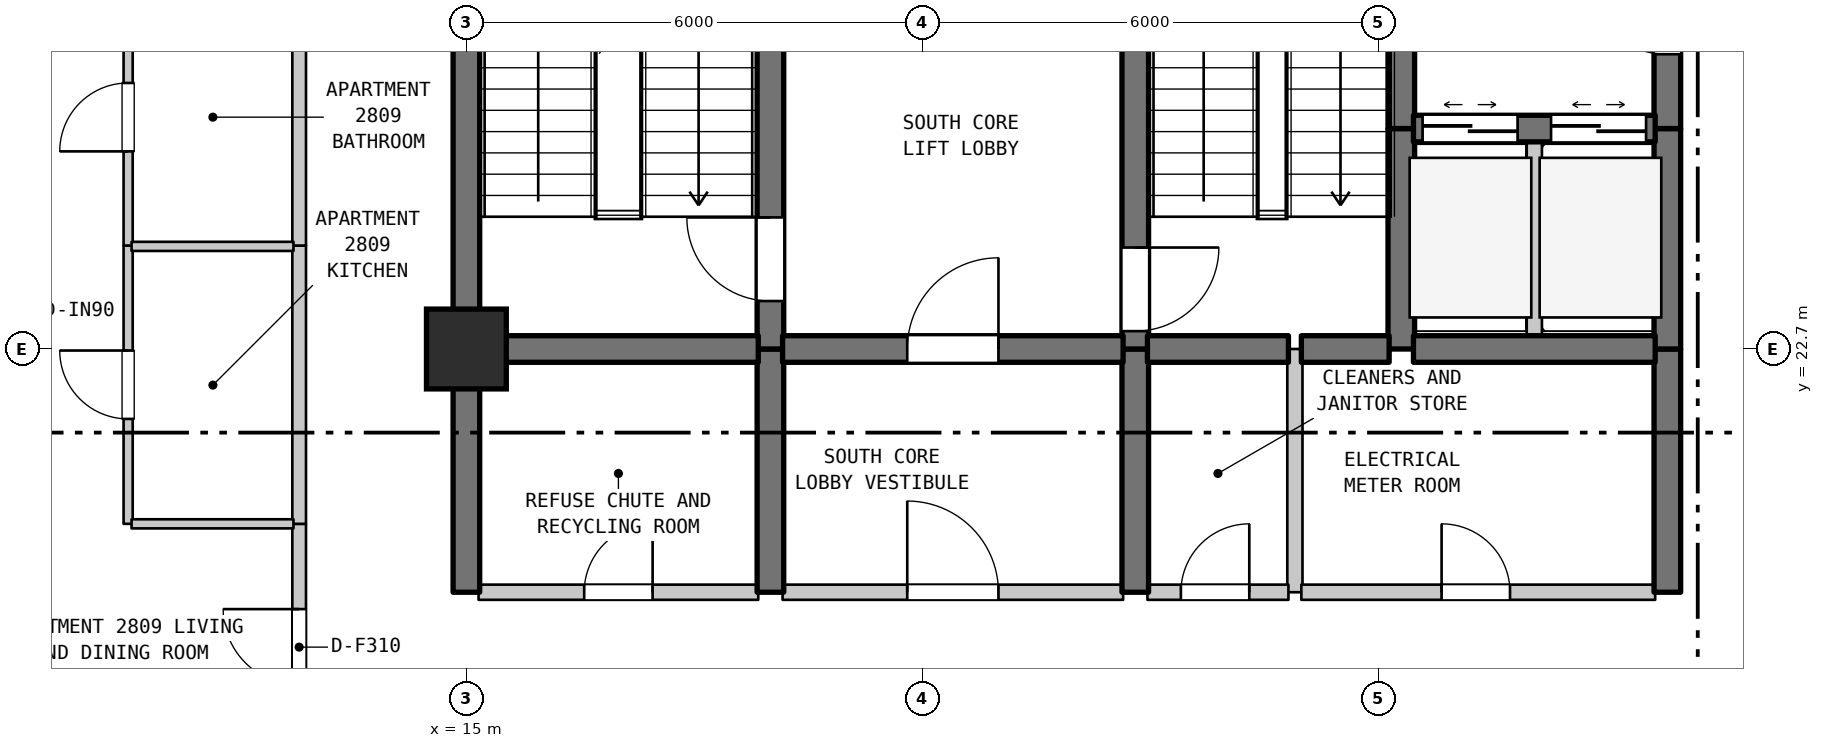
"""IFC4 building model, lengths in metres.
Left out: names, types, materials, properties, quantities, classifications, styles, units other than length and angle.
Written with IfcOpenShell. Run it as: python <this file> out.ifc"""

import sys

from ifc_helpers import new_model, si_unit, direction, frame, frame_2d, origin, origin_2d, place, context, subcontext, project, spatial, rectangle, extrude, element, fill, save


model = new_model("IFC4")
c1 = context("Model", 3, precision=1e-05, world=origin(), true_north=direction((0.0, 1.0)))
c2 = subcontext(c1, "Body", "Model", "MODEL_VIEW")
j1 = project(units=[si_unit("LENGTHUNIT", "METRE"), si_unit("PLANEANGLEUNIT", "RADIAN")], contexts=[c1])
p1 = place(None, origin())
s1 = spatial("IfcSite", under=j1, at=p1, CompositionType="ELEMENT")
p2 = place(p1, origin())
s2 = spatial("IfcBuilding", under=s1, at=p2, CompositionType="ELEMENT")
p3 = place(p2, frame((0.0, 0.0, 116.8)))
s3 = spatial("IfcBuildingStorey", under=s2, at=p3, CompositionType="ELEMENT", Elevation=116.8)
p4 = place(p3, frame((15.0, 22.7, 0.0), z_axis=(0.0, 0.0, 1.0), x_axis=(1.0, 0.0, 0.0)))
e1 = element("IfcColumn", 1, at=p4, inside=s3, PredefinedType="COLUMN", context=c2, shape_type="SweptSolid", body=[
    extrude(rectangle(XDim=1.05, YDim=1.05, at=origin_2d()), origin(), (0.0, 0.0, 1.0), 3.7),
])
p5 = place(p3, frame((10.55, 20.4, 0.0), z_axis=(0.0, 0.0, 1.0), x_axis=(0.0, 1.0, 0.0)))
e2 = element("IfcWall", 2, at=p5, inside=s3, PredefinedType="PARTITIONING", context=c2, shape_type="SweptSolid", body=[
    extrude(rectangle(XDim=3.661, YDim=0.12, at=frame_2d((1.831, 0.0))), origin(), (0.0, 0.0, 1.0), 3.38),
])
p6 = place(p5, frame((1.38, 0.0, 0.0)))
e3 = element("IfcOpeningElement", 3, at=p6, cuts=e2, PredefinedType="OPENING", context=c2, shape_type="SweptSolid", body=[
    extrude(rectangle(XDim=0.9, YDim=2.15, at=frame_2d((0.45, 1.075))), frame((0.0, 0.07, 0.0), z_axis=(0.0, -1.0, 0.0), x_axis=(1.0, 0.0, 0.0)), (0.0, 0.0, 1.0), 0.14),
])
p7 = place(p3, frame((10.55, 24.061, 0.0), z_axis=(0.0, 0.0, 1.0), x_axis=(0.0, 1.0, 0.0)))
e4 = element("IfcWall", 4, at=p7, inside=s3, PredefinedType="PARTITIONING", context=c2, shape_type="SweptSolid", body=[
    extrude(rectangle(XDim=3.379, YDim=0.12, at=frame_2d((1.689, 0.0))), origin(), (0.0, 0.0, 1.0), 3.38),
])
p8 = place(p7, frame((1.239, 0.0, 0.0)))
e5 = element("IfcOpeningElement", 5, at=p8, cuts=e4, PredefinedType="OPENING", context=c2, shape_type="SweptSolid", body=[
    extrude(rectangle(XDim=0.9, YDim=2.1, at=frame_2d((0.45, 1.05))), frame((0.0, 0.07, 0.0), z_axis=(0.0, -1.0, 0.0), x_axis=(1.0, 0.0, 0.0)), (0.0, 0.0, 1.0), 0.14),
])
p9 = place(p3, frame((12.8, 17.3, 0.0), z_axis=(0.0, 0.0, 1.0), x_axis=(0.0, 1.0, 0.0)))
e6 = element("IfcWall", 6, at=p9, inside=s3, PredefinedType="STANDARD", context=c2, shape_type="SweptSolid", body=[
    extrude(rectangle(XDim=3.1, YDim=0.18, at=frame_2d((1.55, 0.0))), origin(), (0.0, 0.0, 1.0), 3.38),
])
p10 = place(p9, frame((0.978, 0.0, 0.0)))
e7 = element("IfcOpeningElement", 7, at=p10, cuts=e6, PredefinedType="OPENING", context=c2, shape_type="SweptSolid", body=[
    extrude(rectangle(XDim=1.0, YDim=2.15, at=frame_2d((0.5, 1.075))), frame((0.0, 0.1, 0.0), z_axis=(0.0, -1.0, 0.0), x_axis=(1.0, 0.0, 0.0)), (0.0, 0.0, 1.0), 0.2),
])
p11 = place(p3, frame((12.8, 20.4, 0.0), z_axis=(0.0, 0.0, 1.0), x_axis=(0.0, 1.0, 0.0)))
e8 = element("IfcWall", 8, at=p11, inside=s3, PredefinedType="STANDARD", context=c2, shape_type="SweptSolid", body=[
    extrude(rectangle(XDim=3.661, YDim=0.18, at=frame_2d((1.831, 0.0))), origin(), (0.0, 0.0, 1.0), 3.38),
])
p12 = place(p3, frame((12.8, 24.061, 0.0), z_axis=(0.0, 0.0, 1.0), x_axis=(0.0, 1.0, 0.0)))
e9 = element("IfcWall", 9, at=p12, inside=s3, PredefinedType="STANDARD", context=c2, shape_type="SweptSolid", body=[
    extrude(rectangle(XDim=3.379, YDim=0.18, at=frame_2d((1.689, 0.0))), origin(), (0.0, 0.0, 1.0), 3.38),
])
p13 = place(p3, frame((15.0, 19.5, 0.0), z_axis=(0.0, 0.0, 1.0), x_axis=(0.0, 1.0, 0.0)))
e10 = element("IfcWall", 10, at=p13, inside=s3, PredefinedType="SHEAR", context=c2, shape_type="SweptSolid", body=[
    extrude(rectangle(XDim=3.2, YDim=0.35, at=frame_2d((1.6, 0.0))), origin(), (0.0, 0.0, 1.0), 3.38),
])
p14 = place(p3, frame((15.0, 22.7, 0.0), z_axis=(0.0, 0.0, 1.0), x_axis=(0.0, 1.0, 0.0)))
e11 = element("IfcWall", 11, at=p14, inside=s3, PredefinedType="SHEAR", context=c2, shape_type="SweptSolid", body=[
    extrude(rectangle(XDim=6.8, YDim=0.35, at=frame_2d((3.4, 0.0))), origin(), (0.0, 0.0, 1.0), 3.38),
])
p15 = place(p3, frame((19.0, 19.5, 0.0), z_axis=(0.0, 0.0, 1.0), x_axis=(0.0, 1.0, 0.0)))
e12 = element("IfcWall", 12, at=p15, inside=s3, PredefinedType="SHEAR", context=c2, shape_type="SweptSolid", body=[
    extrude(rectangle(XDim=3.2, YDim=0.35, at=frame_2d((1.6, 0.0))), origin(), (0.0, 0.0, 1.0), 3.38),
])
p16 = place(p3, frame((19.0, 22.7, 0.0), z_axis=(0.0, 0.0, 1.0), x_axis=(0.0, 1.0, 0.0)))
e13 = element("IfcWall", 13, at=p16, inside=s3, PredefinedType="SHEAR", context=c2, shape_type="SweptSolid", body=[
    extrude(rectangle(XDim=5.5, YDim=0.35, at=frame_2d((2.75, 0.0))), origin(), (0.0, 0.0, 1.0), 3.38),
])
p17 = place(p16, frame((0.631, 0.0, 0.0)))
e14 = element("IfcOpeningElement", 14, at=p17, cuts=e13, PredefinedType="OPENING", context=c2, shape_type="SweptSolid", body=[
    extrude(rectangle(XDim=1.1, YDim=2.15, at=frame_2d((0.55, 1.075))), frame((0.0, 0.185, 0.0), z_axis=(0.0, -1.0, 0.0), x_axis=(1.0, 0.0, 0.0)), (0.0, 0.0, 1.0), 0.37),
])
p18 = place(p3, frame((23.8, 19.5, 0.0), z_axis=(0.0, 0.0, 1.0), x_axis=(0.0, 1.0, 0.0)))
e15 = element("IfcWall", 15, at=p18, inside=s3, PredefinedType="SHEAR", context=c2, shape_type="SweptSolid", body=[
    extrude(rectangle(XDim=3.2, YDim=0.35, at=frame_2d((1.6, 0.0))), origin(), (0.0, 0.0, 1.0), 3.38),
])
p19 = place(p3, frame((23.8, 22.7, 0.0), z_axis=(0.0, 0.0, 1.0), x_axis=(0.0, 1.0, 0.0)))
e16 = element("IfcWall", 16, at=p19, inside=s3, PredefinedType="SHEAR", context=c2, shape_type="SweptSolid", body=[
    extrude(rectangle(XDim=5.5, YDim=0.35, at=frame_2d((2.75, 0.0))), origin(), (0.0, 0.0, 1.0), 3.38),
])
p20 = place(p19, frame((0.235, 0.0, 0.0)))
e17 = element("IfcOpeningElement", 17, at=p20, cuts=e16, PredefinedType="OPENING", context=c2, shape_type="SweptSolid", body=[
    extrude(rectangle(XDim=1.1, YDim=2.15, at=frame_2d((0.55, 1.075))), frame((0.0, 0.185, 0.0), z_axis=(0.0, -1.0, 0.0), x_axis=(1.0, 0.0, 0.0)), (0.0, 0.0, 1.0), 0.37),
])
p21 = place(p3, frame((25.9, 19.5, 0.0), z_axis=(0.0, 0.0, 1.0), x_axis=(0.0, 1.0, 0.0)))
e18 = element("IfcWall", 18, at=p21, inside=s3, PredefinedType="STANDARD", context=c2, shape_type="SweptSolid", body=[
    extrude(rectangle(XDim=3.2, YDim=0.2, at=frame_2d((1.6, 0.0))), origin(), (0.0, 0.0, 1.0), 3.38),
])
p22 = place(p3, frame((27.3, 22.7, 0.0), z_axis=(0.0, 0.0, 1.0), x_axis=(0.0, 1.0, 0.0)))
e19 = element("IfcWall", 19, at=p22, inside=s3, PredefinedType="SHEAR", context=c2, shape_type="SweptSolid", body=[
    extrude(rectangle(XDim=2.9, YDim=0.35, at=frame_2d((1.45, 0.0))), origin(), (0.0, 0.0, 1.0), 3.38),
])
p23 = place(p3, frame((27.3, 25.6, 0.0), z_axis=(0.0, 0.0, 1.0), x_axis=(0.0, 1.0, 0.0)))
e20 = element("IfcWall", 20, at=p23, inside=s3, PredefinedType="SHEAR", context=c2, shape_type="SweptSolid", body=[
    extrude(rectangle(XDim=3.3, YDim=0.35, at=frame_2d((1.65, 0.0))), origin(), (0.0, 0.0, 1.0), 3.38),
])
p24 = place(p3, frame((29.05, 22.7, 0.0), z_axis=(0.0, 0.0, 1.0), x_axis=(0.0, 1.0, 0.0)))
e21 = element("IfcWall", 21, at=p24, inside=s3, PredefinedType="STANDARD", context=c2, shape_type="SweptSolid", body=[
    extrude(rectangle(XDim=2.9, YDim=0.2, at=frame_2d((1.45, 0.0))), origin(), (0.0, 0.0, 1.0), 3.38),
])
p25 = place(p3, frame((30.8, 19.5, 0.0), z_axis=(0.0, 0.0, 1.0), x_axis=(0.0, 1.0, 0.0)))
e22 = element("IfcWall", 22, at=p25, inside=s3, PredefinedType="SHEAR", context=c2, shape_type="SweptSolid", body=[
    extrude(rectangle(XDim=3.2, YDim=0.35, at=frame_2d((1.6, 0.0))), origin(), (0.0, 0.0, 1.0), 3.38),
])
p26 = place(p3, frame((30.8, 22.7, 0.0), z_axis=(0.0, 0.0, 1.0), x_axis=(0.0, 1.0, 0.0)))
e23 = element("IfcWall", 23, at=p26, inside=s3, PredefinedType="SHEAR", context=c2, shape_type="SweptSolid", body=[
    extrude(rectangle(XDim=2.9, YDim=0.35, at=frame_2d((1.45, 0.0))), origin(), (0.0, 0.0, 1.0), 3.38),
])
p27 = place(p3, frame((30.8, 25.6, 0.0), z_axis=(0.0, 0.0, 1.0), x_axis=(0.0, 1.0, 0.0)))
e24 = element("IfcWall", 24, at=p27, inside=s3, PredefinedType="SHEAR", context=c2, shape_type="SweptSolid", body=[
    extrude(rectangle(XDim=3.3, YDim=0.35, at=frame_2d((1.65, 0.0))), origin(), (0.0, 0.0, 1.0), 3.38),
])
p28 = place(p27, frame((0.978, 0.0, 0.0)))
e25 = element("IfcOpeningElement", 25, at=p28, cuts=e24, PredefinedType="OPENING", context=c2, shape_type="SweptSolid", body=[
    extrude(rectangle(XDim=1.2, YDim=2.2, at=frame_2d((0.6, 1.1))), frame((0.0, 0.185, 0.0), z_axis=(0.0, -1.0, 0.0), x_axis=(1.0, 0.0, 0.0)), (0.0, 0.0, 1.0), 0.37),
])
p29 = place(p3, frame((15.16, 19.5, 0.0), z_axis=(0.0, 0.0, 1.0), x_axis=(1.0, 0.0, 0.0)))
e26 = element("IfcWall", 26, at=p29, inside=s3, PredefinedType="STANDARD", context=c2, shape_type="SweptSolid", body=[
    extrude(rectangle(XDim=3.68, YDim=0.2, at=frame_2d((1.84, 0.0))), origin(), (0.0, 0.0, 1.0), 3.38),
])
p30 = place(p29, frame((1.39, 0.0, 0.0)))
e27 = element("IfcOpeningElement", 27, at=p30, cuts=e26, PredefinedType="OPENING", context=c2, shape_type="SweptSolid", body=[
    extrude(rectangle(XDim=0.9, YDim=2.15, at=frame_2d((0.45, 1.075))), frame((0.0, 0.11, 0.0), z_axis=(0.0, -1.0, 0.0), x_axis=(1.0, 0.0, 0.0)), (0.0, 0.0, 1.0), 0.22),
])
p31 = place(p3, frame((19.16, 19.5, 0.0), z_axis=(0.0, 0.0, 1.0), x_axis=(1.0, 0.0, 0.0)))
e28 = element("IfcWall", 28, at=p31, inside=s3, PredefinedType="STANDARD", context=c2, shape_type="SweptSolid", body=[
    extrude(rectangle(XDim=4.48, YDim=0.2, at=frame_2d((2.24, 0.0))), origin(), (0.0, 0.0, 1.0), 3.38),
])
p32 = place(p31, frame((1.64, 0.0, 0.0)))
e29 = element("IfcOpeningElement", 29, at=p32, cuts=e28, PredefinedType="OPENING", context=c2, shape_type="SweptSolid", body=[
    extrude(rectangle(XDim=1.2, YDim=2.2, at=frame_2d((0.6, 1.1))), frame((0.0, 0.11, 0.0), z_axis=(0.0, -1.0, 0.0), x_axis=(1.0, 0.0, 0.0)), (0.0, 0.0, 1.0), 0.22),
])
p33 = place(p3, frame((23.96, 19.5, 0.0), z_axis=(0.0, 0.0, 1.0), x_axis=(1.0, 0.0, 0.0)))
e30 = element("IfcWall", 30, at=p33, inside=s3, PredefinedType="STANDARD", context=c2, shape_type="SweptSolid", body=[
    extrude(rectangle(XDim=1.855, YDim=0.2, at=frame_2d((0.927, 0.0))), origin(), (0.0, 0.0, 1.0), 3.38),
])
p34 = place(p33, frame((0.44, 0.0, 0.0)))
e31 = element("IfcOpeningElement", 31, at=p34, cuts=e30, PredefinedType="OPENING", context=c2, shape_type="SweptSolid", body=[
    extrude(rectangle(XDim=0.9, YDim=2.15, at=frame_2d((0.45, 1.075))), frame((0.0, 0.11, 0.0), z_axis=(0.0, -1.0, 0.0), x_axis=(1.0, 0.0, 0.0)), (0.0, 0.0, 1.0), 0.22),
])
p35 = place(p3, frame((25.985, 19.5, 0.0), z_axis=(0.0, 0.0, 1.0), x_axis=(1.0, 0.0, 0.0)))
e32 = element("IfcWall", 32, at=p35, inside=s3, PredefinedType="STANDARD", context=c2, shape_type="SweptSolid", body=[
    extrude(rectangle(XDim=4.655, YDim=0.2, at=frame_2d((2.327, 0.0))), origin(), (0.0, 0.0, 1.0), 3.38),
])
p36 = place(p35, frame((1.845, 0.0, 0.0)))
e33 = element("IfcOpeningElement", 33, at=p36, cuts=e32, PredefinedType="OPENING", context=c2, shape_type="SweptSolid", body=[
    extrude(rectangle(XDim=0.9, YDim=2.15, at=frame_2d((0.45, 1.075))), frame((0.0, 0.11, 0.0), z_axis=(0.0, -1.0, 0.0), x_axis=(1.0, 0.0, 0.0)), (0.0, 0.0, 1.0), 0.22),
])
p37 = place(p3, frame((10.595, 20.4, 0.0), z_axis=(0.0, 0.0, 1.0), x_axis=(1.0, 0.0, 0.0)))
e34 = element("IfcWall", 34, at=p37, inside=s3, PredefinedType="PARTITIONING", context=c2, shape_type="SweptSolid", body=[
    extrude(rectangle(XDim=2.13, YDim=0.12, at=frame_2d((1.065, 0.0))), origin(), (0.0, 0.0, 1.0), 3.38),
])
p38 = place(p3, frame((15.16, 22.7, 0.0), z_axis=(0.0, 0.0, 1.0), x_axis=(1.0, 0.0, 0.0)))
e35 = element("IfcWall", 35, at=p38, inside=s3, PredefinedType="SHEAR", context=c2, shape_type="SweptSolid", body=[
    extrude(rectangle(XDim=3.68, YDim=0.35, at=frame_2d((1.84, 0.0))), origin(), (0.0, 0.0, 1.0), 3.38),
])
p39 = place(p3, frame((19.16, 22.7, 0.0), z_axis=(0.0, 0.0, 1.0), x_axis=(1.0, 0.0, 0.0)))
e36 = element("IfcWall", 36, at=p39, inside=s3, PredefinedType="SHEAR", context=c2, shape_type="SweptSolid", body=[
    extrude(rectangle(XDim=4.48, YDim=0.35, at=frame_2d((2.24, 0.0))), origin(), (0.0, 0.0, 1.0), 3.38),
])
p40 = place(p39, frame((1.64, 0.0, 0.0)))
e37 = element("IfcOpeningElement", 37, at=p40, cuts=e36, PredefinedType="OPENING", context=c2, shape_type="SweptSolid", body=[
    extrude(rectangle(XDim=1.2, YDim=2.2, at=frame_2d((0.6, 1.1))), frame((0.0, 0.185, 0.0), z_axis=(0.0, -1.0, 0.0), x_axis=(1.0, 0.0, 0.0)), (0.0, 0.0, 1.0), 0.37),
])
p41 = place(p3, frame((23.96, 22.7, 0.0), z_axis=(0.0, 0.0, 1.0), x_axis=(1.0, 0.0, 0.0)))
e38 = element("IfcWall", 38, at=p41, inside=s3, PredefinedType="SHEAR", context=c2, shape_type="SweptSolid", body=[
    extrude(rectangle(XDim=1.855, YDim=0.35, at=frame_2d((0.927, 0.0))), origin(), (0.0, 0.0, 1.0), 3.38),
])
p42 = place(p3, frame((25.985, 22.7, 0.0), z_axis=(0.0, 0.0, 1.0), x_axis=(1.0, 0.0, 0.0)))
e39 = element("IfcWall", 39, at=p42, inside=s3, PredefinedType="SHEAR", context=c2, shape_type="SweptSolid", body=[
    extrude(rectangle(XDim=1.155, YDim=0.35, at=frame_2d((0.577, 0.0))), origin(), (0.0, 0.0, 1.0), 3.38),
])
p43 = place(p3, frame((27.46, 22.7, 0.0), z_axis=(0.0, 0.0, 1.0), x_axis=(1.0, 0.0, 0.0)))
e40 = element("IfcWall", 40, at=p43, inside=s3, PredefinedType="SHEAR", context=c2, shape_type="SweptSolid", body=[
    extrude(rectangle(XDim=3.18, YDim=0.35, at=frame_2d((1.59, 0.0))), origin(), (0.0, 0.0, 1.0), 3.38),
])
p44 = place(p3, frame((10.595, 24.05, 0.0), z_axis=(0.0, 0.0, 1.0), x_axis=(1.0, 0.0, 0.0)))
e41 = element("IfcWall", 41, at=p44, inside=s3, PredefinedType="PARTITIONING", context=c2, shape_type="SweptSolid", body=[
    extrude(rectangle(XDim=2.13, YDim=0.12, at=frame_2d((1.065, 0.0))), origin(), (0.0, 0.0, 1.0), 3.38),
])
p45 = place(p3, frame((27.46, 25.6, 0.0), z_axis=(0.0, 0.0, 1.0), x_axis=(1.0, 0.0, 0.0)))
e42 = element("IfcWall", 42, at=p45, inside=s3, PredefinedType="SHEAR", context=c2, shape_type="SweptSolid", body=[
    extrude(rectangle(XDim=3.18, YDim=0.35, at=frame_2d((1.59, 0.0))), origin(), (0.0, 0.0, 1.0), 3.38),
])
p46 = place(p45, frame((0.12, 0.0, 0.0)))
e43 = element("IfcOpeningElement", 43, at=p46, cuts=e42, PredefinedType="OPENING", context=c2, shape_type="SweptSolid", body=[
    extrude(rectangle(XDim=1.25, YDim=2.2, at=frame_2d((0.625, 1.1))), frame((0.0, 0.185, 0.0), z_axis=(0.0, -1.0, 0.0), x_axis=(1.0, 0.0, 0.0)), (0.0, 0.0, 1.0), 0.37),
])
p47 = place(p45, frame((1.81, 0.0, 0.0)))
e44 = element("IfcOpeningElement", 44, at=p47, cuts=e42, PredefinedType="OPENING", context=c2, shape_type="SweptSolid", body=[
    extrude(rectangle(XDim=1.25, YDim=2.2, at=frame_2d((0.625, 1.1))), frame((0.0, 0.185, 0.0), z_axis=(0.0, -1.0, 0.0), x_axis=(1.0, 0.0, 0.0)), (0.0, 0.0, 1.0), 0.37),
])
p48 = place(p6, origin())
e45 = element("IfcDoor", 45, at=p48, inside=s3, OperationType="SINGLE_SWING_RIGHT", PredefinedType="DOOR", context=c2, shape_type="SweptSolid", body=[
    extrude(rectangle(XDim=0.9, YDim=2.15, at=frame_2d((0.45, 1.075))), frame((0.0, 0.025, 0.0), z_axis=(0.0, -1.0, 0.0), x_axis=(1.0, 0.0, 0.0)), (0.0, 0.0, 1.0), 0.05),
])
fill(e3, e45)
p49 = place(p8, origin())
e46 = element("IfcDoor", 46, at=p49, inside=s3, OperationType="SINGLE_SWING_LEFT", PredefinedType="DOOR", context=c2, shape_type="SweptSolid", body=[
    extrude(rectangle(XDim=0.9, YDim=2.1, at=frame_2d((0.45, 1.05))), frame((0.0, 0.025, 0.0), z_axis=(0.0, -1.0, 0.0), x_axis=(1.0, 0.0, 0.0)), (0.0, 0.0, 1.0), 0.05),
])
fill(e5, e46)
p50 = place(p10, origin())
e47 = element("IfcDoor", 47, at=p50, inside=s3, OperationType="SINGLE_SWING_RIGHT", PredefinedType="DOOR", context=c2, shape_type="SweptSolid", body=[
    extrude(rectangle(XDim=1.0, YDim=2.15, at=frame_2d((0.5, 1.075))), frame((0.0, 0.025, 0.0), z_axis=(0.0, -1.0, 0.0), x_axis=(1.0, 0.0, 0.0)), (0.0, 0.0, 1.0), 0.05),
])
fill(e7, e47)
p51 = place(p17, origin())
e48 = element("IfcDoor", 48, at=p51, inside=s3, OperationType="SINGLE_SWING_RIGHT", PredefinedType="DOOR", context=c2, shape_type="SweptSolid", body=[
    extrude(rectangle(XDim=1.1, YDim=2.15, at=frame_2d((0.55, 1.075))), frame((0.0, 0.025, 0.0), z_axis=(0.0, -1.0, 0.0), x_axis=(1.0, 0.0, 0.0)), (0.0, 0.0, 1.0), 0.05),
])
fill(e14, e48)
p52 = place(p20, frame((1.1, 0.0, 0.0), z_axis=(0.0, 0.0, 1.0), x_axis=(-1.0, 0.0, 0.0)))
e49 = element("IfcDoor", 49, at=p52, inside=s3, OperationType="SINGLE_SWING_RIGHT", PredefinedType="DOOR", context=c2, shape_type="SweptSolid", body=[
    extrude(rectangle(XDim=1.1, YDim=2.15, at=frame_2d((0.55, 1.075))), frame((0.0, 0.025, 0.0), z_axis=(0.0, -1.0, 0.0), x_axis=(1.0, 0.0, 0.0)), (0.0, 0.0, 1.0), 0.05),
])
fill(e17, e49)
p53 = place(p28, origin())
e50 = element("IfcDoor", 50, at=p53, inside=s3, OperationType="SINGLE_SWING_RIGHT", PredefinedType="DOOR", context=c2, shape_type="SweptSolid", body=[
    extrude(rectangle(XDim=1.2, YDim=2.2, at=frame_2d((0.6, 1.1))), frame((0.0, 0.025, 0.0), z_axis=(0.0, -1.0, 0.0), x_axis=(1.0, 0.0, 0.0)), (0.0, 0.0, 1.0), 0.05),
])
fill(e25, e50)
p54 = place(p30, origin())
e51 = element("IfcDoor", 51, at=p54, inside=s3, OperationType="SINGLE_SWING_RIGHT", PredefinedType="DOOR", context=c2, shape_type="SweptSolid", body=[
    extrude(rectangle(XDim=0.9, YDim=2.15, at=frame_2d((0.45, 1.075))), frame((0.0, 0.025, 0.0), z_axis=(0.0, -1.0, 0.0), x_axis=(1.0, 0.0, 0.0)), (0.0, 0.0, 1.0), 0.05),
])
fill(e27, e51)
p55 = place(p32, origin())
e52 = element("IfcDoor", 52, at=p55, inside=s3, OperationType="SINGLE_SWING_LEFT", PredefinedType="DOOR", context=c2, shape_type="SweptSolid", body=[
    extrude(rectangle(XDim=1.2, YDim=2.2, at=frame_2d((0.6, 1.1))), frame((0.0, 0.025, 0.0), z_axis=(0.0, -1.0, 0.0), x_axis=(1.0, 0.0, 0.0)), (0.0, 0.0, 1.0), 0.05),
])
fill(e29, e52)
p56 = place(p34, origin())
e53 = element("IfcDoor", 53, at=p56, inside=s3, OperationType="SINGLE_SWING_RIGHT", PredefinedType="DOOR", context=c2, shape_type="SweptSolid", body=[
    extrude(rectangle(XDim=0.9, YDim=2.15, at=frame_2d((0.45, 1.075))), frame((0.0, 0.025, 0.0), z_axis=(0.0, -1.0, 0.0), x_axis=(1.0, 0.0, 0.0)), (0.0, 0.0, 1.0), 0.05),
])
fill(e31, e53)
p57 = place(p36, origin())
e54 = element("IfcDoor", 54, at=p57, inside=s3, OperationType="SINGLE_SWING_LEFT", PredefinedType="DOOR", context=c2, shape_type="SweptSolid", body=[
    extrude(rectangle(XDim=0.9, YDim=2.15, at=frame_2d((0.45, 1.075))), frame((0.0, 0.025, 0.0), z_axis=(0.0, -1.0, 0.0), x_axis=(1.0, 0.0, 0.0)), (0.0, 0.0, 1.0), 0.05),
])
fill(e33, e54)
p58 = place(p40, origin())
e55 = element("IfcDoor", 55, at=p58, inside=s3, OperationType="SINGLE_SWING_RIGHT", PredefinedType="DOOR", context=c2, shape_type="SweptSolid", body=[
    extrude(rectangle(XDim=1.2, YDim=2.2, at=frame_2d((0.6, 1.1))), frame((0.0, 0.025, 0.0), z_axis=(0.0, -1.0, 0.0), x_axis=(1.0, 0.0, 0.0)), (0.0, 0.0, 1.0), 0.05),
])
fill(e37, e55)
p59 = place(p46, origin())
e56 = element("IfcDoor", 56, at=p59, inside=s3, OperationType="DOUBLE_DOOR_SLIDING", PredefinedType="DOOR", context=c2, shape_type="SweptSolid", body=[
    extrude(rectangle(XDim=1.25, YDim=2.2, at=frame_2d((0.625, 1.1))), frame((0.0, 0.025, 0.0), z_axis=(0.0, -1.0, 0.0), x_axis=(1.0, 0.0, 0.0)), (0.0, 0.0, 1.0), 0.05),
])
fill(e43, e56)
p60 = place(p47, origin())
e57 = element("IfcDoor", 57, at=p60, inside=s3, OperationType="DOUBLE_DOOR_SLIDING", PredefinedType="DOOR", context=c2, shape_type="SweptSolid", body=[
    extrude(rectangle(XDim=1.25, YDim=2.2, at=frame_2d((0.625, 1.1))), frame((0.0, 0.025, 0.0), z_axis=(0.0, -1.0, 0.0), x_axis=(1.0, 0.0, 0.0)), (0.0, 0.0, 1.0), 0.05),
])
fill(e44, e57)
save(model, sys.argv[1])
